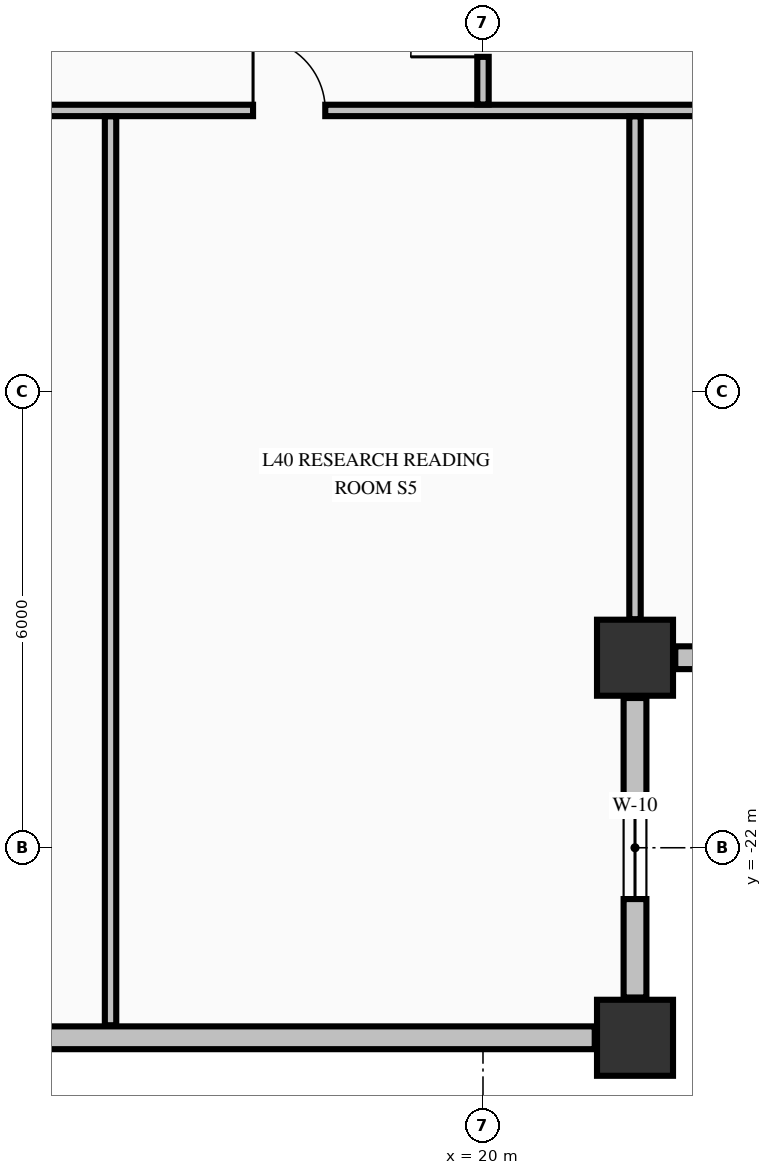
"""IFC4 building model, lengths in metres.
Left out: names, types, materials, properties, quantities, classifications, styles, units other than length and angle.
Written with IfcOpenShell. Run it as: python <this file> out.ifc"""

import sys

from ifc_helpers import new_model, si_unit, direction, frame, frame_2d, origin, origin_2d, place, context, subcontext, project, spatial, rectangle, extrude, element, fill, save


model = new_model("IFC4")
c1 = context("Model", 3, precision=1e-05, world=origin(), true_north=direction((0.0, 1.0)))
c2 = subcontext(c1, "Body", "Model", "MODEL_VIEW")
j1 = project(units=[si_unit("LENGTHUNIT", "METRE"), si_unit("PLANEANGLEUNIT", "RADIAN")], contexts=[c1])
p1 = place(None, origin())
s1 = spatial("IfcSite", under=j1, at=p1, CompositionType="ELEMENT")
p2 = place(p1, origin())
s2 = spatial("IfcBuilding", under=s1, at=p2, CompositionType="ELEMENT")
p3 = place(p2, frame((0.0, 0.0, 158.24)))
s3 = spatial("IfcBuildingStorey", under=s2, at=p3, CompositionType="ELEMENT", Elevation=158.24)
for number, where, z_axis, x_axis in (
    (1, (22.0, -24.5, -0.425), (0.0, 0.0, 1.0), (1.0, 0.0, 0.0)),
    (2, (22.0, -19.5, -0.425), (0.0, 0.0, 1.0), (1.0, 0.0, 0.0)),
):
    element("IfcColumn", number, at=place(p3, frame(where, z_axis=z_axis, x_axis=x_axis)), inside=s3, PredefinedType="COLUMN", context=c2, shape_type="SweptSolid", body=[
        extrude(rectangle(XDim=1.0, YDim=1.0, at=origin_2d()), origin(), (0.0, 0.0, 1.0), 4.595),
    ])
p4 = place(p3, frame((22.0, -23.97, 0.0), z_axis=(0.0, 0.0, 1.0), x_axis=(0.0, 1.0, 0.0)))
e3 = element("IfcWall", 3, at=p4, inside=s3, PredefinedType="STANDARD", context=c2, shape_type="SweptSolid", body=[
    extrude(rectangle(XDim=3.94, YDim=0.3, at=frame_2d((1.97, 0.0))), origin(), (0.0, 0.0, 1.0), 2.362),
])
p5 = place(p4, frame((1.295, 0.0, 0.68)))
e4 = element("IfcOpeningElement", 4, at=p5, cuts=e3, PredefinedType="OPENING", context=c2, shape_type="SweptSolid", body=[
    extrude(rectangle(XDim=1.35, YDim=1.42, at=frame_2d((0.675, 0.71))), frame((0.0, 0.16, 0.0), z_axis=(0.0, -1.0, 0.0), x_axis=(1.0, 0.0, 0.0)), (0.0, 0.0, 1.0), 0.32),
])
p6 = place(p3, frame((22.53, -19.5, 0.0), z_axis=(0.0, 0.0, 1.0), x_axis=(1.0, 0.0, 0.0)))
e5 = element("IfcWall", 5, at=p6, inside=s3, PredefinedType="STANDARD", context=c2, shape_type="SweptSolid", body=[
    extrude(rectangle(XDim=3.94, YDim=0.3, at=frame_2d((1.97, 0.0))), origin(), (0.0, 0.0, 1.0), 2.362),
])
p7 = place(p6, frame((1.295, 0.0, 0.68)))
e6 = element("IfcOpeningElement", 6, at=p7, cuts=e5, PredefinedType="OPENING", context=c2, shape_type="SweptSolid", body=[
    extrude(rectangle(XDim=1.35, YDim=1.42, at=frame_2d((0.675, 0.71))), frame((0.0, 0.16, 0.0), z_axis=(0.0, -1.0, 0.0), x_axis=(1.0, 0.0, 0.0)), (0.0, 0.0, 1.0), 0.32),
])
p8 = place(p3, frame((11.53, -24.5, 0.0), z_axis=(0.0, 0.0, 1.0), x_axis=(1.0, 0.0, 0.0)))
e7 = element("IfcWall", 7, at=p8, inside=s3, PredefinedType="STANDARD", context=c2, shape_type="SweptSolid", body=[
    extrude(rectangle(XDim=9.94, YDim=0.3, at=frame_2d((4.97, 0.0))), origin(), (0.0, 0.0, 1.0), 1.962),
])
p9 = place(p3, frame((-20.075, -12.3, 0.0), z_axis=(0.0, 0.0, 1.0), x_axis=(1.0, 0.0, 0.0)))
e8 = element("IfcWall", 8, at=p9, inside=s3, PredefinedType="PARTITIONING", context=c2, shape_type="SweptSolid", body=[
    extrude(rectangle(XDim=46.91, YDim=0.15, at=frame_2d((23.455, 0.0))), origin(), (0.0, 0.0, 1.0), 4.17),
])
p10 = place(p9, frame((12.0, 0.0, 0.0)))
e9 = element("IfcOpeningElement", 9, at=p10, cuts=e8, PredefinedType="OPENING", context=c2, shape_type="SweptSolid", body=[
    extrude(rectangle(XDim=1.05, YDim=2.15, at=frame_2d((0.525, 1.075))), frame((0.0, 0.085, 0.0), z_axis=(0.0, -1.0, 0.0), x_axis=(1.0, 0.0, 0.0)), (0.0, 0.0, 1.0), 0.17),
])
p11 = place(p9, frame((16.4, 0.0, 0.0)))
e10 = element("IfcOpeningElement", 10, at=p11, cuts=e8, PredefinedType="OPENING", context=c2, shape_type="SweptSolid", body=[
    extrude(rectangle(XDim=0.95, YDim=2.15, at=frame_2d((0.475, 1.075))), frame((0.0, 0.085, 0.0), z_axis=(0.0, -1.0, 0.0), x_axis=(1.0, 0.0, 0.0)), (0.0, 0.0, 1.0), 0.17),
])
p12 = place(p9, frame((22.3, 0.0, 0.0)))
e11 = element("IfcOpeningElement", 11, at=p12, cuts=e8, PredefinedType="OPENING", context=c2, shape_type="SweptSolid", body=[
    extrude(rectangle(XDim=0.95, YDim=2.15, at=frame_2d((0.475, 1.075))), frame((0.0, 0.085, 0.0), z_axis=(0.0, -1.0, 0.0), x_axis=(1.0, 0.0, 0.0)), (0.0, 0.0, 1.0), 0.17),
])
p13 = place(p9, frame((33.0, 0.0, 0.0)))
e12 = element("IfcOpeningElement", 12, at=p13, cuts=e8, PredefinedType="OPENING", context=c2, shape_type="SweptSolid", body=[
    extrude(rectangle(XDim=1.05, YDim=2.15, at=frame_2d((0.525, 1.075))), frame((0.0, 0.085, 0.0), z_axis=(0.0, -1.0, 0.0), x_axis=(1.0, 0.0, 0.0)), (0.0, 0.0, 1.0), 0.17),
])
p14 = place(p9, frame((37.05, 0.0, 0.0)))
e13 = element("IfcOpeningElement", 13, at=p14, cuts=e8, PredefinedType="OPENING", context=c2, shape_type="SweptSolid", body=[
    extrude(rectangle(XDim=0.95, YDim=2.15, at=frame_2d((0.475, 1.075))), frame((0.0, 0.085, 0.0), z_axis=(0.0, -1.0, 0.0), x_axis=(1.0, 0.0, 0.0)), (0.0, 0.0, 1.0), 0.17),
])
p15 = place(p3, frame((15.1, -24.335, 0.0), z_axis=(0.0, 0.0, 1.0), x_axis=(0.0, 1.0, 0.0)))
e14 = element("IfcWall", 14, at=p15, inside=s3, PredefinedType="PARTITIONING", context=c2, shape_type="SweptSolid", body=[
    extrude(rectangle(XDim=11.957, YDim=0.15, at=frame_2d((5.979, 0.0))), origin(), (0.0, 0.0, 1.0), 4.17),
])
p16 = place(p3, frame((20.0, -12.222, 0.0), z_axis=(0.0, 0.0, 1.0), x_axis=(0.0, 1.0, 0.0)))
e15 = element("IfcWall", 15, at=p16, inside=s3, PredefinedType="PARTITIONING", context=c2, shape_type="SweptSolid", body=[
    extrude(rectangle(XDim=1.841, YDim=0.15, at=frame_2d((0.92, 0.0))), origin(), (0.0, 0.0, 1.0), 3.36),
])
p17 = place(p16, frame((0.627, 0.0, 0.0)))
e16 = element("IfcOpeningElement", 16, at=p17, cuts=e15, PredefinedType="OPENING", context=c2, shape_type="SweptSolid", body=[
    extrude(rectangle(XDim=0.95, YDim=2.15, at=frame_2d((0.475, 1.075))), frame((0.0, 0.085, 0.0), z_axis=(0.0, -1.0, 0.0), x_axis=(1.0, 0.0, 0.0)), (0.0, 0.0, 1.0), 0.17),
])
p18 = place(p3, frame((22.0, -18.994, 0.0), z_axis=(0.0, 0.0, 1.0), x_axis=(0.0, 1.0, 0.0)))
e17 = element("IfcWall", 17, at=p18, inside=s3, PredefinedType="PARTITIONING", context=c2, shape_type="SweptSolid", body=[
    extrude(rectangle(XDim=6.616, YDim=0.15, at=frame_2d((3.308, 0.0))), origin(), (0.0, 0.0, 1.0), 4.17),
])
p19 = place(p5, origin())
e18 = element("IfcWindow", 18, at=p19, inside=s3, PartitioningType="SINGLE_PANEL", PredefinedType="WINDOW", context=c2, shape_type="SweptSolid", body=[
    extrude(rectangle(XDim=1.35, YDim=1.42, at=frame_2d((0.675, 0.71))), frame((0.0, 0.03, 0.0), z_axis=(0.0, -1.0, 0.0), x_axis=(1.0, 0.0, 0.0)), (0.0, 0.0, 1.0), 0.06),
])
fill(e4, e18)
p20 = place(p14, origin())
e19 = element("IfcDoor", 19, at=p20, inside=s3, OperationType="SINGLE_SWING_LEFT", PredefinedType="DOOR", context=c2, shape_type="SweptSolid", body=[
    extrude(rectangle(XDim=0.95, YDim=2.15, at=frame_2d((0.475, 1.075))), frame((0.0, 0.025, 0.0), z_axis=(0.0, -1.0, 0.0), x_axis=(1.0, 0.0, 0.0)), (0.0, 0.0, 1.0), 0.05),
])
fill(e13, e19)
p21 = place(p17, origin())
e20 = element("IfcDoor", 20, at=p21, inside=s3, OperationType="SINGLE_SWING_LEFT", PredefinedType="DOOR", context=c2, shape_type="SweptSolid", body=[
    extrude(rectangle(XDim=0.95, YDim=2.15, at=frame_2d((0.475, 1.075))), frame((0.0, 0.025, 0.0), z_axis=(0.0, -1.0, 0.0), x_axis=(1.0, 0.0, 0.0)), (0.0, 0.0, 1.0), 0.05),
])
fill(e16, e20)
save(model, sys.argv[1])
